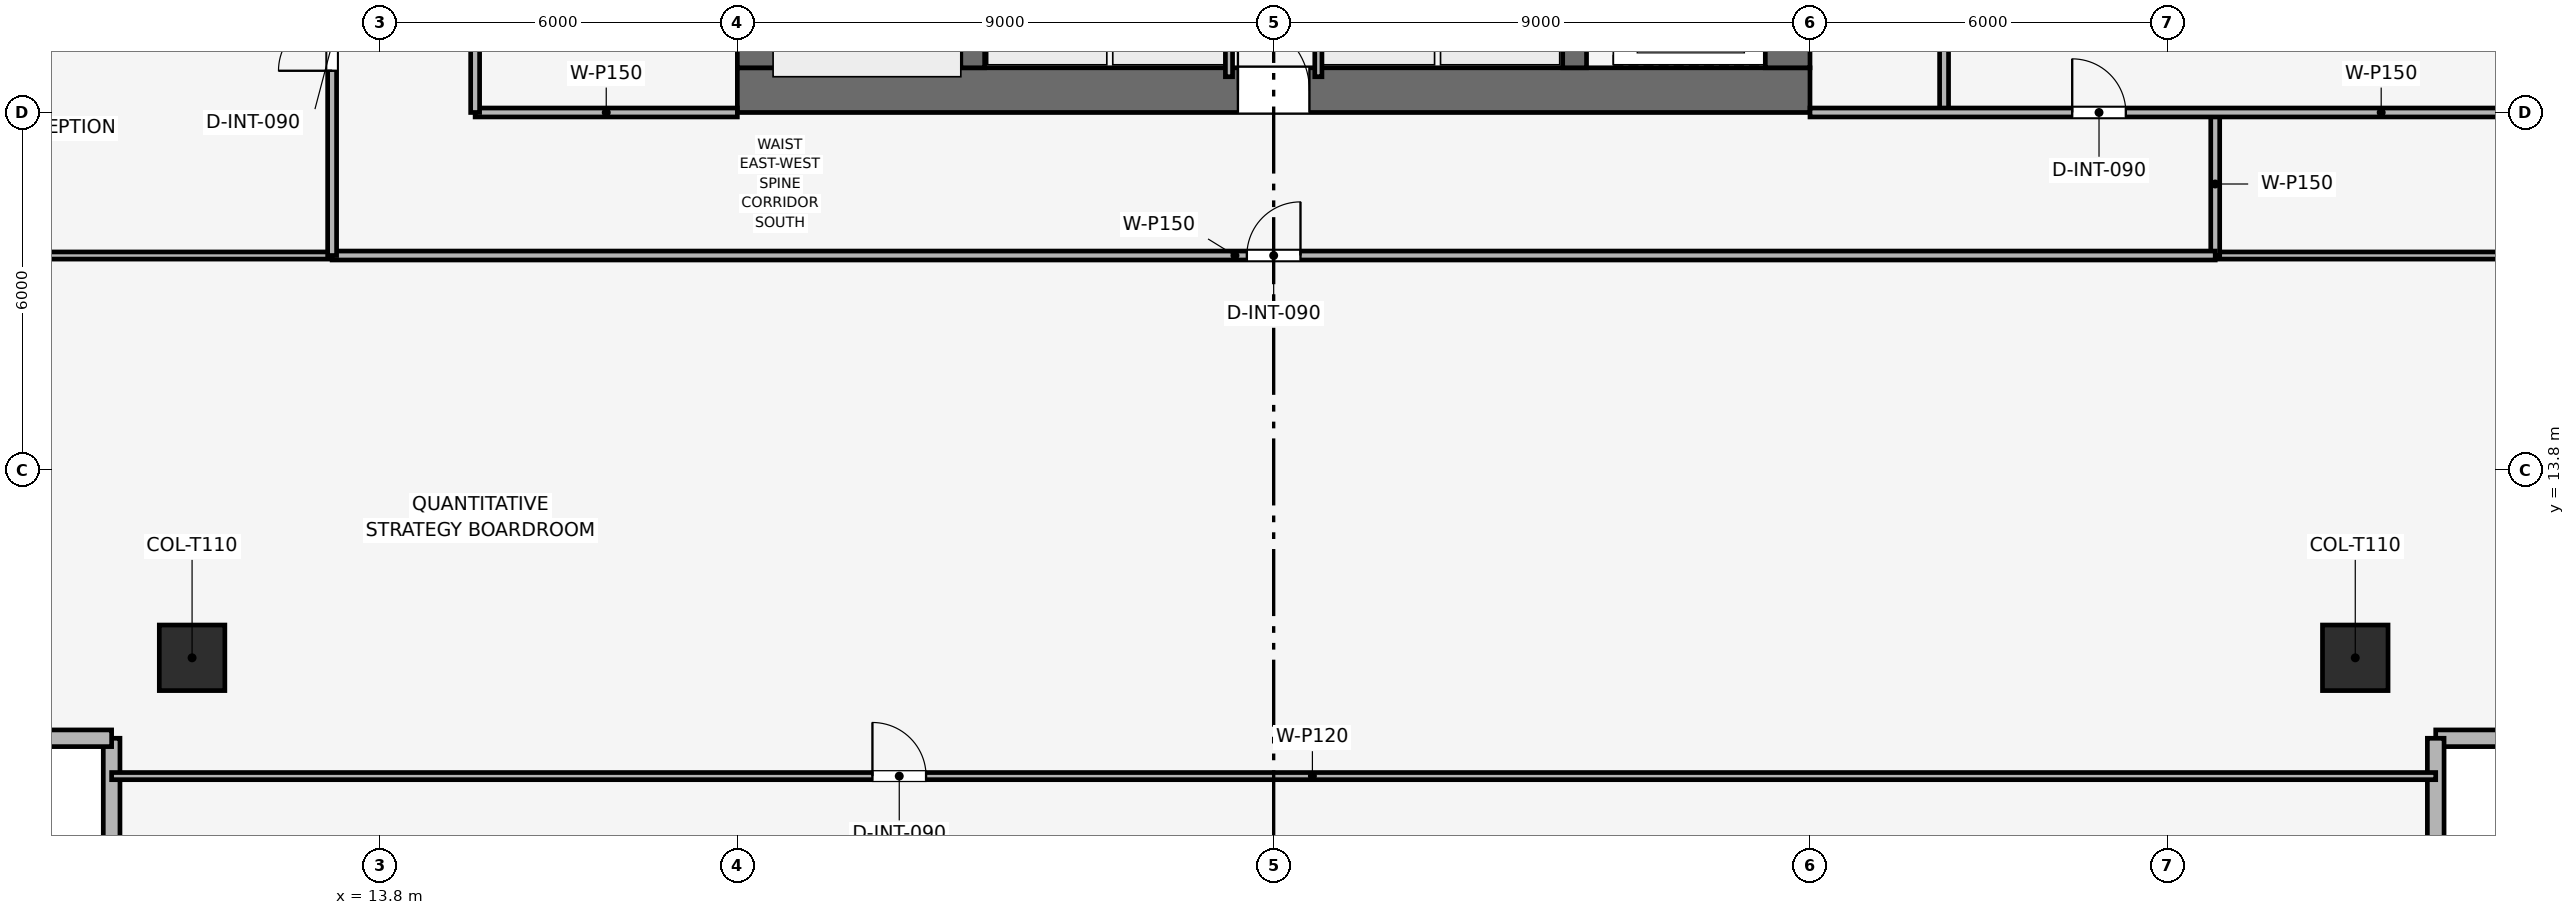
"""IFC4 building model, lengths in metres.
Left out: names, types, materials, properties, quantities, classifications, styles, units other than length and angle.
Written with IfcOpenShell. Run it as: python <this file> out.ifc"""

import sys

from ifc_helpers import new_model, si_unit, direction, frame, frame_2d, origin, origin_2d, place, context, subcontext, project, spatial, rectangle, extrude, element, fill, save


model = new_model("IFC4")
c1 = context("Model", 3, precision=1e-05, world=origin(), true_north=direction((0.0, 1.0)))
c2 = subcontext(c1, "Body", "Model", "MODEL_VIEW")
j1 = project(units=[si_unit("LENGTHUNIT", "METRE"), si_unit("PLANEANGLEUNIT", "RADIAN")], contexts=[c1])
p1 = place(None, origin())
s1 = spatial("IfcSite", under=j1, at=p1, CompositionType="ELEMENT")
p2 = place(p1, origin())
s2 = spatial("IfcBuilding", under=s1, at=p2, CompositionType="ELEMENT")
p3 = place(p2, frame((0.0, 0.0, 207.45)))
s3 = spatial("IfcBuildingStorey", under=s2, at=p3, CompositionType="ELEMENT", Elevation=207.45)
p4 = place(p3, frame((19.8, 20.175, 0.0), z_axis=(0.0, 0.0, 1.0), x_axis=(1.0, 0.0, 0.0)))
e1 = element("IfcWall", 1, at=p4, inside=s3, PredefinedType="SHEAR", context=c2, shape_type="SweptSolid", body=[
    extrude(rectangle(XDim=18.0, YDim=0.75, at=frame_2d((9.0, 0.0))), origin(), (0.0, 0.0, 1.0), 3.75),
])
p5 = place(p4, frame((8.4, 0.0, 0.0)))
e2 = element("IfcOpeningElement", 2, at=p5, cuts=e1, PredefinedType="OPENING", context=c2, shape_type="SweptSolid", body=[
    extrude(rectangle(XDim=1.2, YDim=2.2, at=frame_2d((0.6, 1.1))), frame((0.0, 0.385, 0.0), z_axis=(0.0, -1.0, 0.0), x_axis=(1.0, 0.0, 0.0)), (0.0, 0.0, 1.0), 0.77),
])
p6 = place(p3, frame((20.175, 20.55, 0.0), z_axis=(0.0, 0.0, 1.0), x_axis=(0.0, 1.0, 0.0)))
e3 = element("IfcWall", 3, at=p6, inside=s3, PredefinedType="SHEAR", context=c2, shape_type="SweptSolid", body=[
    extrude(rectangle(XDim=16.5, YDim=0.75, at=frame_2d((8.25, 0.0))), origin(), (0.0, 0.0, 1.0), 3.75),
])
p7 = place(p6, frame((10.25, 0.0, 0.0)))
e4 = element("IfcOpeningElement", 4, at=p7, cuts=e3, PredefinedType="OPENING", context=c2, shape_type="SweptSolid", body=[
    extrude(rectangle(XDim=1.1, YDim=2.15, at=frame_2d((0.55, 1.075))), frame((0.0, 0.385, 0.0), z_axis=(0.0, -1.0, 0.0), x_axis=(1.0, 0.0, 0.0)), (0.0, 0.0, 1.0), 0.77),
])
p8 = place(p3, frame((37.425, 20.55, 0.0), z_axis=(0.0, 0.0, 1.0), x_axis=(0.0, 1.0, 0.0)))
e5 = element("IfcWall", 5, at=p8, inside=s3, PredefinedType="SHEAR", context=c2, shape_type="SweptSolid", body=[
    extrude(rectangle(XDim=16.5, YDim=0.75, at=frame_2d((8.25, 0.0))), origin(), (0.0, 0.0, 1.0), 3.75),
])
p9 = place(p8, frame((4.75, 0.0, 0.0)))
e6 = element("IfcOpeningElement", 6, at=p9, cuts=e5, PredefinedType="OPENING", context=c2, shape_type="SweptSolid", body=[
    extrude(rectangle(XDim=1.1, YDim=2.15, at=frame_2d((0.55, 1.075))), frame((0.0, 0.385, 0.0), z_axis=(0.0, -1.0, 0.0), x_axis=(1.0, 0.0, 0.0)), (0.0, 0.0, 1.0), 0.77),
])
for number, where, z_axis, x_axis in (
    (7, (23.75, 20.55, 0.0), (0.0, 0.0, 1.0), (0.0, 1.0, 0.0)),
    (8, (33.85, 20.55, 0.0), (0.0, 0.0, 1.0), (0.0, 1.0, 0.0)),
):
    element("IfcWall", number, at=place(p3, frame(where, z_axis=z_axis, x_axis=x_axis)), inside=s3, PredefinedType="SHEAR", context=c2, shape_type="SweptSolid", body=[
        extrude(rectangle(XDim=16.5, YDim=0.4, at=frame_2d((8.25, 0.0))), origin(), (0.0, 0.0, 1.0), 3.75),
    ])
for number, where, z_axis, x_axis in (
    (9, (10.65, 10.65, 0.003), (0.0, 0.0, 1.0), (1.0, 0.0, 0.0)),
    (10, (46.95, 10.65, 0.003), (0.0, 0.0, 1.0), (1.0, 0.0, 0.0)),
):
    element("IfcColumn", number, at=place(p3, frame(where, z_axis=z_axis, x_axis=x_axis)), inside=s3, PredefinedType="COLUMN", context=c2, shape_type="SweptSolid", body=[
        extrude(rectangle(XDim=1.1, YDim=1.1, at=origin_2d()), origin(), (0.0, 0.0, 1.0), 3.494),
    ])
p10 = place(p3, frame((9.3, 1.93, 0.0), z_axis=(0.0, 0.0, 1.0), x_axis=(0.0, 1.0, 0.0)))
e11 = element("IfcWall", 11, at=p10, inside=s3, PredefinedType="SOLIDWALL", context=c2, shape_type="SweptSolid", body=[
    extrude(rectangle(XDim=7.37, YDim=0.28, at=frame_2d((3.685, 0.0))), origin(), (0.0, 0.0, 1.0), 3.5),
])
p11 = place(p10, frame((2.435, 0.0, 0.9)))
e12 = element("IfcOpeningElement", 12, at=p11, cuts=e11, PredefinedType="OPENING", context=c2, shape_type="SweptSolid", body=[
    extrude(rectangle(XDim=2.5, YDim=1.9, at=frame_2d((1.25, 0.95))), frame((0.0, 0.15, 0.0), z_axis=(0.0, -1.0, 0.0), x_axis=(1.0, 0.0, 0.0)), (0.0, 0.0, 1.0), 0.3),
])
p12 = place(p3, frame((9.3, 9.3, 0.0), z_axis=(0.0, 0.0, 1.0), x_axis=(-1.0, 0.0, 0.0)))
e13 = element("IfcWall", 13, at=p12, inside=s3, PredefinedType="SOLIDWALL", context=c2, shape_type="SweptSolid", body=[
    extrude(rectangle(XDim=7.37, YDim=0.28, at=frame_2d((3.685, 0.0))), origin(), (0.0, 0.0, 1.0), 3.5),
])
p13 = place(p12, frame((2.435, 0.0, 0.9)))
e14 = element("IfcOpeningElement", 14, at=p13, cuts=e13, PredefinedType="OPENING", context=c2, shape_type="SweptSolid", body=[
    extrude(rectangle(XDim=2.5, YDim=1.9, at=frame_2d((1.25, 0.95))), frame((0.0, 0.15, 0.0), z_axis=(0.0, -1.0, 0.0), x_axis=(1.0, 0.0, 0.0)), (0.0, 0.0, 1.0), 0.3),
])
p14 = place(p3, frame((55.67, 9.3, 0.0), z_axis=(0.0, 0.0, 1.0), x_axis=(-1.0, 0.0, 0.0)))
e15 = element("IfcWall", 15, at=p14, inside=s3, PredefinedType="SOLIDWALL", context=c2, shape_type="SweptSolid", body=[
    extrude(rectangle(XDim=7.37, YDim=0.28, at=frame_2d((3.685, 0.0))), origin(), (0.0, 0.0, 1.0), 3.5),
])
p15 = place(p14, frame((2.435, 0.0, 0.9)))
e16 = element("IfcOpeningElement", 16, at=p15, cuts=e15, PredefinedType="OPENING", context=c2, shape_type="SweptSolid", body=[
    extrude(rectangle(XDim=2.5, YDim=1.9, at=frame_2d((1.25, 0.95))), frame((0.0, 0.15, 0.0), z_axis=(0.0, -1.0, 0.0), x_axis=(1.0, 0.0, 0.0)), (0.0, 0.0, 1.0), 0.3),
])
p16 = place(p3, frame((48.3, 9.3, 0.0), z_axis=(0.0, 0.0, 1.0), x_axis=(0.0, -1.0, 0.0)))
e17 = element("IfcWall", 17, at=p16, inside=s3, PredefinedType="SOLIDWALL", context=c2, shape_type="SweptSolid", body=[
    extrude(rectangle(XDim=7.37, YDim=0.28, at=frame_2d((3.685, 0.0))), origin(), (0.0, 0.0, 1.0), 3.5),
])
p17 = place(p16, frame((2.435, 0.0, 0.9)))
e18 = element("IfcOpeningElement", 18, at=p17, cuts=e17, PredefinedType="OPENING", context=c2, shape_type="SweptSolid", body=[
    extrude(rectangle(XDim=2.5, YDim=1.9, at=frame_2d((1.25, 0.95))), frame((0.0, 0.15, 0.0), z_axis=(0.0, -1.0, 0.0), x_axis=(1.0, 0.0, 0.0)), (0.0, 0.0, 1.0), 0.3),
])
for number, where, z_axis, x_axis in (
    (19, (28.05, 20.4, 0.0), (0.0, 0.0, 1.0), (0.0, 1.0, 0.0)),
    (20, (29.55, 20.4, 0.0), (0.0, 0.0, 1.0), (0.0, 1.0, 0.0)),
):
    element("IfcWall", number, at=place(p3, frame(where, z_axis=z_axis, x_axis=x_axis)), inside=s3, PredefinedType="PARTITIONING", context=c2, shape_type="SweptSolid", body=[
        extrude(rectangle(XDim=2.75, YDim=0.12, at=frame_2d((1.375, 0.0))), origin(), (0.0, 0.0, 1.0), 3.5),
    ])
p18 = place(p3, frame((15.4, 19.8, 0.0), z_axis=(0.0, 0.0, 1.0), x_axis=(1.0, 0.0, 0.0)))
e21 = element("IfcWall", 21, at=p18, inside=s3, PredefinedType="PARTITIONING", context=c2, shape_type="SweptSolid", body=[
    extrude(rectangle(XDim=4.4, YDim=0.15, at=frame_2d((2.2, 0.0))), origin(), (0.0, 0.0, 1.0), 3.035),
])
p19 = place(p3, frame((15.4, 19.8, 0.0), z_axis=(0.0, 0.0, 1.0), x_axis=(0.0, 1.0, 0.0)))
e22 = element("IfcWall", 22, at=p19, inside=s3, PredefinedType="PARTITIONING", context=c2, shape_type="SweptSolid", body=[
    extrude(rectangle(XDim=10.35, YDim=0.15, at=frame_2d((5.175, 0.0))), origin(), (0.0, 0.0, 1.0), 3.035),
])
p20 = place(p19, frame((1.2, 0.0, 0.0)))
e23 = element("IfcOpeningElement", 23, at=p20, cuts=e22, PredefinedType="OPENING", context=c2, shape_type="SweptSolid", body=[
    extrude(rectangle(XDim=0.9, YDim=2.1, at=frame_2d((0.45, 1.05))), frame((0.0, 0.085, 0.0), z_axis=(0.0, -1.0, 0.0), x_axis=(1.0, 0.0, 0.0)), (0.0, 0.0, 1.0), 0.17),
])
p21 = place(p19, frame((4.7, 0.0, 0.0)))
e24 = element("IfcOpeningElement", 24, at=p21, cuts=e22, PredefinedType="OPENING", context=c2, shape_type="SweptSolid", body=[
    extrude(rectangle(XDim=0.9, YDim=2.1, at=frame_2d((0.45, 1.05))), frame((0.0, 0.085, 0.0), z_axis=(0.0, -1.0, 0.0), x_axis=(1.0, 0.0, 0.0)), (0.0, 0.0, 1.0), 0.17),
])
p22 = place(p19, frame((8.1, 0.0, 0.0)))
e25 = element("IfcOpeningElement", 25, at=p22, cuts=e22, PredefinedType="OPENING", context=c2, shape_type="SweptSolid", body=[
    extrude(rectangle(XDim=0.95, YDim=2.1, at=frame_2d((0.475, 1.05))), frame((0.0, 0.085, 0.0), z_axis=(0.0, -1.0, 0.0), x_axis=(1.0, 0.0, 0.0)), (0.0, 0.0, 1.0), 0.17),
])
p23 = place(p3, frame((40.05, 19.8, 0.0), z_axis=(0.0, 0.0, 1.0), x_axis=(0.0, 1.0, 0.0)))
e26 = element("IfcWall", 26, at=p23, inside=s3, PredefinedType="PARTITIONING", context=c2, shape_type="SweptSolid", body=[
    extrude(rectangle(XDim=7.05, YDim=0.15, at=frame_2d((3.525, 0.0))), origin(), (0.0, 0.0, 1.0), 3.035),
])
p24 = place(p3, frame((9.3, 8.665, 0.0), z_axis=(0.0, 0.0, 1.0), x_axis=(1.0, 0.0, 0.0)))
e27 = element("IfcWall", 27, at=p24, inside=s3, PredefinedType="PARTITIONING", context=c2, shape_type="SweptSolid", body=[
    extrude(rectangle(XDim=39.0, YDim=0.12, at=frame_2d((19.5, 0.0))), origin(), (0.0, 0.0, 1.0), 2.885),
])
p25 = place(p24, frame((12.767, 0.0, 0.0)))
e28 = element("IfcOpeningElement", 28, at=p25, cuts=e27, PredefinedType="OPENING", context=c2, shape_type="SweptSolid", body=[
    extrude(rectangle(XDim=0.9, YDim=2.1, at=frame_2d((0.45, 1.05))), frame((0.0, 0.07, 0.0), z_axis=(0.0, -1.0, 0.0), x_axis=(1.0, 0.0, 0.0)), (0.0, 0.0, 1.0), 0.14),
])
p26 = place(p3, frame((1.93, 17.4, 0.0), z_axis=(0.0, 0.0, 1.0), x_axis=(1.0, 0.0, 0.0)))
e29 = element("IfcWall", 29, at=p26, inside=s3, PredefinedType="PARTITIONING", context=c2, shape_type="SweptSolid", body=[
    extrude(rectangle(XDim=11.07, YDim=0.12, at=frame_2d((5.535, 0.0))), origin(), (0.0, 0.0, 1.0), 2.885),
])
p27 = place(p3, frame((44.6, 17.4, 0.0), z_axis=(0.0, 0.0, 1.0), x_axis=(1.0, 0.0, 0.0)))
e30 = element("IfcWall", 30, at=p27, inside=s3, PredefinedType="PARTITIONING", context=c2, shape_type="SweptSolid", body=[
    extrude(rectangle(XDim=11.07, YDim=0.12, at=frame_2d((5.535, 0.0))), origin(), (0.0, 0.0, 1.0), 2.885),
])
p28 = place(p3, frame((44.6, 17.4, 0.0), z_axis=(0.0, 0.0, 1.0), x_axis=(0.0, 1.0, 0.0)))
e31 = element("IfcWall", 31, at=p28, inside=s3, PredefinedType="PARTITIONING", context=c2, shape_type="SweptSolid", body=[
    extrude(rectangle(XDim=2.4, YDim=0.15, at=frame_2d((1.2, 0.0))), origin(), (0.0, 0.0, 1.0), 3.5),
])
p29 = place(p3, frame((37.8, 19.8, 0.0), z_axis=(0.0, 0.0, 1.0), x_axis=(1.0, 0.0, 0.0)))
e32 = element("IfcWall", 32, at=p29, inside=s3, PredefinedType="PARTITIONING", context=c2, shape_type="SweptSolid", body=[
    extrude(rectangle(XDim=17.87, YDim=0.15, at=frame_2d((8.935, 0.0))), origin(), (0.0, 0.0, 1.0), 2.885),
])
p30 = place(p29, frame((4.4, 0.0, 0.0)))
e33 = element("IfcOpeningElement", 33, at=p30, cuts=e32, PredefinedType="OPENING", context=c2, shape_type="SweptSolid", body=[
    extrude(rectangle(XDim=0.9, YDim=2.1, at=frame_2d((0.45, 1.05))), frame((0.0, 0.085, 0.0), z_axis=(0.0, -1.0, 0.0), x_axis=(1.0, 0.0, 0.0)), (0.0, 0.0, 1.0), 0.17),
])
p31 = place(p3, frame((13.0, 17.4, 0.0), z_axis=(0.0, 0.0, 1.0), x_axis=(1.0, 0.0, 0.0)))
e34 = element("IfcWall", 34, at=p31, inside=s3, PredefinedType="PARTITIONING", context=c2, shape_type="SweptSolid", body=[
    extrude(rectangle(XDim=31.6, YDim=0.15, at=frame_2d((15.8, 0.0))), origin(), (0.0, 0.0, 1.0), 3.035),
])
p32 = place(p31, frame((15.35, 0.0, 0.0)))
e35 = element("IfcOpeningElement", 35, at=p32, cuts=e34, PredefinedType="OPENING", context=c2, shape_type="SweptSolid", body=[
    extrude(rectangle(XDim=0.9, YDim=2.1, at=frame_2d((0.45, 1.05))), frame((0.0, 0.085, 0.0), z_axis=(0.0, -1.0, 0.0), x_axis=(1.0, 0.0, 0.0)), (0.0, 0.0, 1.0), 0.17),
])
p33 = place(p3, frame((13.0, 17.4, 0.0), z_axis=(0.0, 0.0, 1.0), x_axis=(0.0, 1.0, 0.0)))
e36 = element("IfcWall", 36, at=p33, inside=s3, PredefinedType="PARTITIONING", context=c2, shape_type="SweptSolid", body=[
    extrude(rectangle(XDim=22.8, YDim=0.15, at=frame_2d((11.4, 0.0))), origin(), (0.0, 0.0, 1.0), 3.035),
])
p34 = place(p33, frame((3.1, 0.0, 0.0)))
e37 = element("IfcOpeningElement", 37, at=p34, cuts=e36, PredefinedType="OPENING", context=c2, shape_type="SweptSolid", body=[
    extrude(rectangle(XDim=0.9, YDim=2.1, at=frame_2d((0.45, 1.05))), frame((0.0, 0.085, 0.0), z_axis=(0.0, -1.0, 0.0), x_axis=(1.0, 0.0, 0.0)), (0.0, 0.0, 1.0), 0.17),
])
p35 = place(p33, frame((7.685, 0.0, 0.0)))
e38 = element("IfcOpeningElement", 38, at=p35, cuts=e36, PredefinedType="OPENING", context=c2, shape_type="SweptSolid", body=[
    extrude(rectangle(XDim=0.9, YDim=2.1, at=frame_2d((0.45, 1.05))), frame((0.0, 0.085, 0.0), z_axis=(0.0, -1.0, 0.0), x_axis=(1.0, 0.0, 0.0)), (0.0, 0.0, 1.0), 0.17),
])
p36 = place(p33, frame((15.535, 0.0, 0.0)))
e39 = element("IfcOpeningElement", 39, at=p36, cuts=e36, PredefinedType="OPENING", context=c2, shape_type="SweptSolid", body=[
    extrude(rectangle(XDim=0.9, YDim=2.1, at=frame_2d((0.45, 1.05))), frame((0.0, 0.085, 0.0), z_axis=(0.0, -1.0, 0.0), x_axis=(1.0, 0.0, 0.0)), (0.0, 0.0, 1.0), 0.17),
])
p37 = place(p25, origin())
e40 = element("IfcDoor", 40, at=p37, inside=s3, OperationType="SINGLE_SWING_LEFT", PredefinedType="DOOR", context=c2, shape_type="SweptSolid", body=[
    extrude(rectangle(XDim=0.9, YDim=2.1, at=frame_2d((0.45, 1.05))), frame((0.0, 0.025, 0.0), z_axis=(0.0, -1.0, 0.0), x_axis=(1.0, 0.0, 0.0)), (0.0, 0.0, 1.0), 0.05),
])
fill(e28, e40)
p38 = place(p30, origin())
e41 = element("IfcDoor", 41, at=p38, inside=s3, OperationType="SINGLE_SWING_LEFT", PredefinedType="DOOR", context=c2, shape_type="SweptSolid", body=[
    extrude(rectangle(XDim=0.9, YDim=2.1, at=frame_2d((0.45, 1.05))), frame((0.0, 0.025, 0.0), z_axis=(0.0, -1.0, 0.0), x_axis=(1.0, 0.0, 0.0)), (0.0, 0.0, 1.0), 0.05),
])
fill(e33, e41)
p39 = place(p32, origin())
e42 = element("IfcDoor", 42, at=p39, inside=s3, OperationType="SINGLE_SWING_RIGHT", PredefinedType="DOOR", context=c2, shape_type="SweptSolid", body=[
    extrude(rectangle(XDim=0.9, YDim=2.1, at=frame_2d((0.45, 1.05))), frame((0.0, 0.025, 0.0), z_axis=(0.0, -1.0, 0.0), x_axis=(1.0, 0.0, 0.0)), (0.0, 0.0, 1.0), 0.05),
])
fill(e35, e42)
p40 = place(p34, origin())
e43 = element("IfcDoor", 43, at=p40, inside=s3, OperationType="SINGLE_SWING_LEFT", PredefinedType="DOOR", context=c2, shape_type="SweptSolid", body=[
    extrude(rectangle(XDim=0.9, YDim=2.1, at=frame_2d((0.45, 1.05))), frame((0.0, 0.025, 0.0), z_axis=(0.0, -1.0, 0.0), x_axis=(1.0, 0.0, 0.0)), (0.0, 0.0, 1.0), 0.05),
])
fill(e37, e43)
p41 = place(p5, origin())
e44 = element("IfcDoor", 44, at=p41, inside=s3, OperationType="SINGLE_SWING_LEFT", PredefinedType="DOOR", context=c2, shape_type="SweptSolid", body=[
    extrude(rectangle(XDim=1.2, YDim=2.2, at=frame_2d((0.6, 1.1))), frame((0.0, 0.025, 0.0), z_axis=(0.0, -1.0, 0.0), x_axis=(1.0, 0.0, 0.0)), (0.0, 0.0, 1.0), 0.05),
])
fill(e2, e44)
save(model, sys.argv[1])
